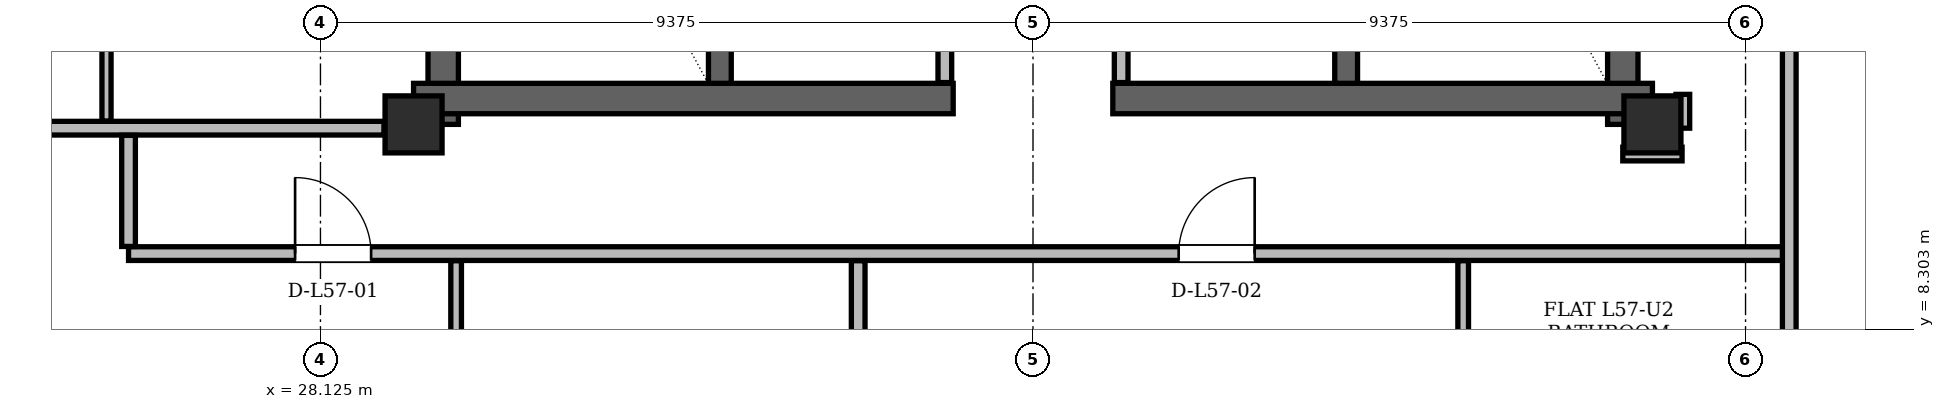
"""IFC4 building model, lengths in metres.
Left out: names, types, materials, properties, quantities, classifications, styles, units other than length and angle.
Written with IfcOpenShell. Run it as: python <this file> out.ifc"""

import sys

from ifc_helpers import new_model, si_unit, direction, frame, frame_2d, origin, origin_2d, place, context, subcontext, project, spatial, rectangle, hollow_rectangle, extrude, element, fill, save


model = new_model("IFC4")
c1 = context("Model", 3, precision=1e-05, world=origin(), true_north=direction((0.0, 1.0)))
c2 = subcontext(c1, "Body", "Model", "MODEL_VIEW")
j1 = project(units=[si_unit("LENGTHUNIT", "METRE"), si_unit("PLANEANGLEUNIT", "RADIAN")], contexts=[c1])
p1 = place(None, origin())
s1 = spatial("IfcSite", under=j1, at=p1, CompositionType="ELEMENT")
p2 = place(p1, origin())
s2 = spatial("IfcBuilding", under=s1, at=p2, CompositionType="ELEMENT")
p3 = place(p2, frame((0.0, 0.0, 216.3)))
s3 = spatial("IfcBuildingStorey", under=s2, at=p3, CompositionType="ELEMENT", Elevation=216.3)
for number, where, z_axis, x_axis in (
    (1, (29.35, 11.0, 0.0), (0.0, 0.0, 1.0), (1.0, 0.0, 0.0)),
    (2, (45.65, 11.0, 0.0), (0.0, 0.0, 1.0), (1.0, 0.0, 0.0)),
):
    element("IfcColumn", number, at=place(p3, frame(where, z_axis=z_axis, x_axis=x_axis)), inside=s3, PredefinedType="COLUMN", context=c2, shape_type="SweptSolid", body=[
        extrude(hollow_rectangle(XDim=0.75, YDim=0.75, WallThickness=0.06, at=origin_2d()), origin(), (0.0, 0.0, 1.0), 3.6),
    ])
for number, where, z_axis, x_axis in (
    (3, (29.74, 11.0, 0.0), (0.0, 0.0, 1.0), (0.0, 1.0, 0.0)),
    (4, (45.26, 11.0, 0.0), (0.0, 0.0, 1.0), (0.0, 1.0, 0.0)),
):
    element("IfcWall", number, at=place(p3, frame(where, z_axis=z_axis, x_axis=x_axis)), inside=s3, PredefinedType="SHEAR", context=c2, shape_type="SweptSolid", body=[
        extrude(rectangle(XDim=13.3, YDim=0.4, at=frame_2d((6.65, 0.0))), origin(), (0.0, 0.0, 1.0), 3.38),
    ])
for number, where, z_axis, x_axis in (
    (5, (29.35, 11.34, 0.0), (0.0, 0.0, 1.0), (1.0, 0.0, 0.0)),
    (6, (38.55, 11.34, 0.0), (0.0, 0.0, 1.0), (1.0, 0.0, 0.0)),
):
    element("IfcWall", number, at=place(p3, frame(where, z_axis=z_axis, x_axis=x_axis)), inside=s3, PredefinedType="SHEAR", context=c2, shape_type="SweptSolid", body=[
        extrude(rectangle(XDim=7.1, YDim=0.4, at=frame_2d((3.55, 0.0))), origin(), (0.0, 0.0, 1.0), 3.38),
    ])
for number, where, z_axis, x_axis in (
    (7, (33.38, 11.54, 0.0), (0.0, 0.0, 1.0), (0.0, 1.0, 0.0)),
    (8, (41.62, 11.54, 0.0), (0.0, 0.0, 1.0), (0.0, 1.0, 0.0)),
):
    element("IfcWall", number, at=place(p3, frame(where, z_axis=z_axis, x_axis=x_axis)), inside=s3, PredefinedType="SHEAR", context=c2, shape_type="SweptSolid", body=[
        extrude(rectangle(XDim=7.62, YDim=0.3, at=frame_2d((3.81, 0.0))), origin(), (0.0, 0.0, 1.0), 3.38),
    ])
p4 = place(p3, frame((59.157, 11.485, 0.0), z_axis=(0.0, 0.0, 1.0), x_axis=(-0.500000353019, 0.866025199969, 0.0)))
e9 = element("IfcWall", 9, at=p4, inside=s3, PredefinedType="SOLIDWALL", context=c2, shape_type="SweptSolid", body=[
    extrude(rectangle(XDim=36.579, YDim=0.29, at=frame_2d((18.289, 0.0))), origin(), (0.0, 0.0, 1.0), 2.677),
])
p5 = place(p4, frame((3.429, 0.0, 0.0)))
e10 = element("IfcOpeningElement", 10, at=p5, cuts=e9, PredefinedType="OPENING", context=c2, shape_type="SweptSolid", body=[
    extrude(rectangle(XDim=1.5, YDim=2.2, at=frame_2d((0.75, 1.1))), frame((0.0, 0.145, 0.0), z_axis=(0.0, -1.0, 0.0), x_axis=(1.0, 0.0, 0.0)), (0.0, 0.0, 1.0), 0.29),
])
p6 = place(p4, frame((27.044, 0.0, 0.0)))
e11 = element("IfcOpeningElement", 11, at=p6, cuts=e9, PredefinedType="OPENING", context=c2, shape_type="SweptSolid", body=[
    extrude(rectangle(XDim=1.5, YDim=2.2, at=frame_2d((0.75, 1.1))), frame((0.0, 0.145, 0.0), z_axis=(0.0, -1.0, 0.0), x_axis=(1.0, 0.0, 0.0)), (0.0, 0.0, 1.0), 0.29),
])
p7 = place(p4, frame((7.913, 0.0, 0.85)))
e12 = element("IfcOpeningElement", 12, at=p7, cuts=e9, PredefinedType="OPENING", context=c2, shape_type="SweptSolid", body=[
    extrude(rectangle(XDim=1.2, YDim=1.48, at=frame_2d((0.6, 0.74))), frame((0.0, 0.145, 0.0), z_axis=(0.0, -1.0, 0.0), x_axis=(1.0, 0.0, 0.0)), (0.0, 0.0, 1.0), 0.29),
])
p8 = place(p4, frame((1.258, 0.0, 0.85)))
e13 = element("IfcOpeningElement", 13, at=p8, cuts=e9, PredefinedType="OPENING", context=c2, shape_type="SweptSolid", body=[
    extrude(rectangle(XDim=1.2, YDim=1.48, at=frame_2d((0.6, 0.74))), frame((0.0, 0.145, 0.0), z_axis=(0.0, -1.0, 0.0), x_axis=(1.0, 0.0, 0.0)), (0.0, 0.0, 1.0), 0.29),
])
p9 = place(p4, frame((12.2, 0.0, 0.85)))
e14 = element("IfcOpeningElement", 14, at=p9, cuts=e9, PredefinedType="OPENING", context=c2, shape_type="SweptSolid", body=[
    extrude(rectangle(XDim=2.0, YDim=1.717, at=frame_2d((1.0, 0.858))), frame((0.0, 0.145, 0.0), z_axis=(0.0, -1.0, 0.0), x_axis=(1.0, 0.0, 0.0)), (0.0, 0.0, 1.0), 0.29),
])
p10 = place(p4, frame((17.302, 0.0, 0.85)))
e15 = element("IfcOpeningElement", 15, at=p10, cuts=e9, PredefinedType="OPENING", context=c2, shape_type="SweptSolid", body=[
    extrude(rectangle(XDim=1.4, YDim=1.6, at=frame_2d((0.7, 0.8))), frame((0.0, 0.145, 0.0), z_axis=(0.0, -1.0, 0.0), x_axis=(1.0, 0.0, 0.0)), (0.0, 0.0, 1.0), 0.29),
])
p11 = place(p4, frame((20.753, 0.0, 0.85)))
e16 = element("IfcOpeningElement", 16, at=p11, cuts=e9, PredefinedType="OPENING", context=c2, shape_type="SweptSolid", body=[
    extrude(rectangle(XDim=1.2, YDim=1.48, at=frame_2d((0.6, 0.74))), frame((0.0, 0.145, 0.0), z_axis=(0.0, -1.0, 0.0), x_axis=(1.0, 0.0, 0.0)), (0.0, 0.0, 1.0), 0.29),
])
p12 = place(p4, frame((34.201, 0.0, 0.85)))
e17 = element("IfcOpeningElement", 17, at=p12, cuts=e9, PredefinedType="OPENING", context=c2, shape_type="SweptSolid", body=[
    extrude(rectangle(XDim=1.2, YDim=1.48, at=frame_2d((0.6, 0.74))), frame((0.0, 0.145, 0.0), z_axis=(0.0, -1.0, 0.0), x_axis=(1.0, 0.0, 0.0)), (0.0, 0.0, 1.0), 0.29),
])
p13 = place(p3, frame((34.132, 43.163, 0.0), z_axis=(0.0, 0.0, 1.0), x_axis=(-0.500000353019, -0.866025199969, 0.0)))
e18 = element("IfcWall", 18, at=p13, inside=s3, PredefinedType="SOLIDWALL", context=c2, shape_type="SweptSolid", body=[
    extrude(rectangle(XDim=36.579, YDim=0.29, at=frame_2d((18.289, 0.0))), origin(), (0.0, 0.0, 1.0), 2.677),
])
p14 = place(p13, frame((3.429, 0.0, 0.0)))
e19 = element("IfcOpeningElement", 19, at=p14, cuts=e18, PredefinedType="OPENING", context=c2, shape_type="SweptSolid", body=[
    extrude(rectangle(XDim=1.5, YDim=2.2, at=frame_2d((0.75, 1.1))), frame((0.0, 0.145, 0.0), z_axis=(0.0, -1.0, 0.0), x_axis=(1.0, 0.0, 0.0)), (0.0, 0.0, 1.0), 0.29),
])
p15 = place(p13, frame((27.044, 0.0, 0.0)))
e20 = element("IfcOpeningElement", 20, at=p15, cuts=e18, PredefinedType="OPENING", context=c2, shape_type="SweptSolid", body=[
    extrude(rectangle(XDim=1.5, YDim=2.2, at=frame_2d((0.75, 1.1))), frame((0.0, 0.145, 0.0), z_axis=(0.0, -1.0, 0.0), x_axis=(1.0, 0.0, 0.0)), (0.0, 0.0, 1.0), 0.29),
])
p16 = place(p13, frame((22.914, 0.0, 0.85)))
e21 = element("IfcOpeningElement", 21, at=p16, cuts=e18, PredefinedType="OPENING", context=c2, shape_type="SweptSolid", body=[
    extrude(rectangle(XDim=1.2, YDim=1.48, at=frame_2d((0.6, 0.74))), frame((0.0, 0.145, 0.0), z_axis=(0.0, -1.0, 0.0), x_axis=(1.0, 0.0, 0.0)), (0.0, 0.0, 1.0), 0.29),
])
p17 = place(p13, frame((33.08, 0.0, 0.85)))
e22 = element("IfcOpeningElement", 22, at=p17, cuts=e18, PredefinedType="OPENING", context=c2, shape_type="SweptSolid", body=[
    extrude(rectangle(XDim=1.2, YDim=1.48, at=frame_2d((0.6, 0.74))), frame((0.0, 0.145, 0.0), z_axis=(0.0, -1.0, 0.0), x_axis=(1.0, 0.0, 0.0)), (0.0, 0.0, 1.0), 0.29),
])
p18 = place(p13, frame((8.479, 0.0, 0.85)))
e23 = element("IfcOpeningElement", 23, at=p18, cuts=e18, PredefinedType="OPENING", context=c2, shape_type="SweptSolid", body=[
    extrude(rectangle(XDim=1.2, YDim=1.48, at=frame_2d((0.6, 0.74))), frame((0.0, 0.145, 0.0), z_axis=(0.0, -1.0, 0.0), x_axis=(1.0, 0.0, 0.0)), (0.0, 0.0, 1.0), 0.29),
])
p19 = place(p13, frame((15.537, 0.0, 0.85)))
e24 = element("IfcOpeningElement", 24, at=p19, cuts=e18, PredefinedType="OPENING", context=c2, shape_type="SweptSolid", body=[
    extrude(rectangle(XDim=2.8, YDim=1.717, at=frame_2d((1.4, 0.858))), frame((0.0, 0.145, 0.0), z_axis=(0.0, -1.0, 0.0), x_axis=(1.0, 0.0, 0.0)), (0.0, 0.0, 1.0), 0.29),
])
p20 = place(p13, frame((1.501, 0.0, 0.85)))
e25 = element("IfcOpeningElement", 25, at=p20, cuts=e18, PredefinedType="OPENING", context=c2, shape_type="SweptSolid", body=[
    extrude(rectangle(XDim=1.2, YDim=1.48, at=frame_2d((0.6, 0.74))), frame((0.0, 0.145, 0.0), z_axis=(0.0, -1.0, 0.0), x_axis=(1.0, 0.0, 0.0)), (0.0, 0.0, 1.0), 0.29),
])
p21 = place(p3, frame((36.34, 11.55, 0.0), z_axis=(0.0, 0.0, 1.0), x_axis=(0.0, 1.0, 0.0)))
e26 = element("IfcWall", 26, at=p21, inside=s3, PredefinedType="PARTITIONING", context=c2, shape_type="SweptSolid", body=[
    extrude(rectangle(XDim=5.55, YDim=0.18, at=frame_2d((2.775, 0.0))), origin(), (0.0, 0.0, 1.0), 3.38),
])
p22 = place(p21, frame((2.85, 0.0, 0.0)))
e27 = element("IfcOpeningElement", 27, at=p22, cuts=e26, PredefinedType="OPENING", context=c2, shape_type="SweptSolid", body=[
    extrude(rectangle(XDim=0.95, YDim=2.1, at=frame_2d((0.475, 1.05))), frame((0.0, 0.09, 0.0), z_axis=(0.0, -1.0, 0.0), x_axis=(1.0, 0.0, 0.0)), (0.0, 0.0, 1.0), 0.18),
])
p23 = place(p3, frame((38.66, 11.55, 0.0), z_axis=(0.0, 0.0, 1.0), x_axis=(0.0, 1.0, 0.0)))
e28 = element("IfcWall", 28, at=p23, inside=s3, PredefinedType="PARTITIONING", context=c2, shape_type="SweptSolid", body=[
    extrude(rectangle(XDim=5.55, YDim=0.18, at=frame_2d((2.775, 0.0))), origin(), (0.0, 0.0, 1.0), 3.38),
])
p24 = place(p23, frame((3.15, 0.0, 0.0)))
e29 = element("IfcOpeningElement", 29, at=p24, cuts=e28, PredefinedType="OPENING", context=c2, shape_type="SweptSolid", body=[
    extrude(rectangle(XDim=0.95, YDim=2.1, at=frame_2d((0.475, 1.05))), frame((0.0, 0.09, 0.0), z_axis=(0.0, -1.0, 0.0), x_axis=(1.0, 0.0, 0.0)), (0.0, 0.0, 1.0), 0.18),
])
p25 = place(p3, frame((25.6, 9.3, 0.0), z_axis=(0.0, 0.0, 1.0), x_axis=(1.0, 0.0, 0.0)))
e30 = element("IfcWall", 30, at=p25, inside=s3, PredefinedType="PARTITIONING", context=c2, shape_type="SweptSolid", body=[
    extrude(rectangle(XDim=21.85, YDim=0.18, at=frame_2d((10.925, 0.0))), origin(), (0.0, 0.0, 1.0), 2.913),
])
p26 = place(p25, frame((2.191, 0.0, 0.0)))
e31 = element("IfcOpeningElement", 31, at=p26, cuts=e30, PredefinedType="OPENING", context=c2, shape_type="SweptSolid", body=[
    extrude(rectangle(XDim=1.0, YDim=2.18, at=frame_2d((0.5, 1.09))), frame((0.0, 0.09, 0.0), z_axis=(0.0, -1.0, 0.0), x_axis=(1.0, 0.0, 0.0)), (0.0, 0.0, 1.0), 0.18),
])
p27 = place(p25, frame((13.817, 0.0, 0.0)))
e32 = element("IfcOpeningElement", 32, at=p27, cuts=e30, PredefinedType="OPENING", context=c2, shape_type="SweptSolid", body=[
    extrude(rectangle(XDim=1.0, YDim=2.18, at=frame_2d((0.5, 1.09))), frame((0.0, 0.09, 0.0), z_axis=(0.0, -1.0, 0.0), x_axis=(1.0, 0.0, 0.0)), (0.0, 0.0, 1.0), 0.18),
])
p28 = place(p3, frame((45.26, 10.61, 0.0), z_axis=(0.0, 0.0, 1.0), x_axis=(1.0, 0.0, 0.0)))
e33 = element("IfcWall", 33, at=p28, inside=s3, PredefinedType="PARTITIONING", context=c2, shape_type="SweptSolid", body=[
    extrude(rectangle(XDim=0.78, YDim=0.18, at=frame_2d((0.39, 0.0))), origin(), (0.0, 0.0, 1.0), 3.38),
])
p29 = place(p3, frame((16.324, 10.95, 0.0), z_axis=(0.0, 0.0, 1.0), x_axis=(1.0, 0.0, 0.0)))
e34 = element("IfcWall", 34, at=p29, inside=s3, PredefinedType="PARTITIONING", context=c2, shape_type="SweptSolid", body=[
    extrude(rectangle(XDim=12.636, YDim=0.18, at=frame_2d((6.318, 0.0))), origin(), (0.0, 0.0, 1.0), 2.913),
])
p30 = place(p3, frame((25.31, 11.044, 0.0), z_axis=(0.0, 0.0, 1.0), x_axis=(0.0, 1.0, 0.0)))
e35 = element("IfcWall", 35, at=p30, inside=s3, PredefinedType="PARTITIONING", context=c2, shape_type="SweptSolid", body=[
    extrude(rectangle(XDim=3.592, YDim=0.12, at=frame_2d((1.796, 0.0))), origin(), (0.0, 0.0, 1.0), 3.38),
])
p31 = place(p3, frame((25.6, 9.394, 0.0), z_axis=(0.0, 0.0, 1.0), x_axis=(0.0, 1.0, 0.0)))
e36 = element("IfcWall", 36, at=p31, inside=s3, PredefinedType="PARTITIONING", context=c2, shape_type="SweptSolid", body=[
    extrude(rectangle(XDim=1.462, YDim=0.18, at=frame_2d((0.731, 0.0))), origin(), (0.0, 0.0, 1.0), 3.38),
])
p32 = place(p3, frame((29.91, 5.801, 0.0), z_axis=(0.0, 0.0, 1.0), x_axis=(0.0, 1.0, 0.0)))
e37 = element("IfcWall", 37, at=p32, inside=s3, PredefinedType="PARTITIONING", context=c2, shape_type="SweptSolid", body=[
    extrude(rectangle(XDim=3.405, YDim=0.14, at=frame_2d((1.703, 0.0))), origin(), (0.0, 0.0, 1.0), 3.38),
])
p33 = place(p32, frame((1.31, 0.0, 0.0)))
e38 = element("IfcOpeningElement", 38, at=p33, cuts=e37, PredefinedType="OPENING", context=c2, shape_type="SweptSolid", body=[
    extrude(rectangle(XDim=0.88, YDim=2.08, at=frame_2d((0.44, 1.04))), frame((0.0, 0.07, 0.0), z_axis=(0.0, -1.0, 0.0), x_axis=(1.0, 0.0, 0.0)), (0.0, 0.0, 1.0), 0.14),
])
p34 = place(p3, frame((35.2, 5.801, 0.0), z_axis=(0.0, 0.0, 1.0), x_axis=(0.0, 1.0, 0.0)))
e39 = element("IfcWall", 39, at=p34, inside=s3, PredefinedType="PARTITIONING", context=c2, shape_type="SweptSolid", body=[
    extrude(rectangle(XDim=3.405, YDim=0.18, at=frame_2d((1.703, 0.0))), origin(), (0.0, 0.0, 1.0), 3.38),
])
p35 = place(p3, frame((43.16, 5.801, 0.0), z_axis=(0.0, 0.0, 1.0), x_axis=(0.0, 1.0, 0.0)))
e40 = element("IfcWall", 40, at=p35, inside=s3, PredefinedType="PARTITIONING", context=c2, shape_type="SweptSolid", body=[
    extrude(rectangle(XDim=3.405, YDim=0.14, at=frame_2d((1.703, 0.0))), origin(), (0.0, 0.0, 1.0), 3.38),
])
p36 = place(p35, frame((1.31, 0.0, 0.0)))
e41 = element("IfcOpeningElement", 41, at=p36, cuts=e40, PredefinedType="OPENING", context=c2, shape_type="SweptSolid", body=[
    extrude(rectangle(XDim=0.88, YDim=2.08, at=frame_2d((0.44, 1.04))), frame((0.0, 0.07, 0.0), z_axis=(0.0, -1.0, 0.0), x_axis=(1.0, 0.0, 0.0)), (0.0, 0.0, 1.0), 0.14),
])
p37 = place(p3, frame((46.05, 10.95, 0.0), z_axis=(0.0, 0.0, 1.0), x_axis=(0.0, 1.0, 0.0)))
e42 = element("IfcWall", 42, at=p37, inside=s3, PredefinedType="PARTITIONING", context=c2, shape_type="SweptSolid", body=[
    extrude(rectangle(XDim=0.445, YDim=0.18, at=frame_2d((0.223, 0.0))), origin(), (0.0, 0.0, 1.0), 2.913),
])
p38 = place(p3, frame((47.45, 5.801, 0.0), z_axis=(0.0, 0.0, 1.0), x_axis=(0.0, 1.0, 0.0)))
e43 = element("IfcWall", 43, at=p38, inside=s3, PredefinedType="PARTITIONING", context=c2, shape_type="SweptSolid", body=[
    extrude(rectangle(XDim=25.664, YDim=0.18, at=frame_2d((12.832, 0.0))), origin(), (0.0, 0.0, 1.0), 2.913),
])
p39 = place(p38, frame((9.122, 0.0, 0.0)))
e44 = element("IfcOpeningElement", 44, at=p39, cuts=e43, PredefinedType="OPENING", context=c2, shape_type="SweptSolid", body=[
    extrude(rectangle(XDim=1.0, YDim=2.18, at=frame_2d((0.5, 1.09))), frame((0.0, 0.09, 0.0), z_axis=(0.0, -1.0, 0.0), x_axis=(1.0, 0.0, 0.0)), (0.0, 0.0, 1.0), 0.18),
])
p40 = place(p38, frame((15.912, 0.0, 0.0)))
e45 = element("IfcOpeningElement", 45, at=p40, cuts=e43, PredefinedType="OPENING", context=c2, shape_type="SweptSolid", body=[
    extrude(rectangle(XDim=1.0, YDim=2.18, at=frame_2d((0.5, 1.09))), frame((0.0, 0.09, 0.0), z_axis=(0.0, -1.0, 0.0), x_axis=(1.0, 0.0, 0.0)), (0.0, 0.0, 1.0), 0.18),
])
p41 = place(p26, origin())
e46 = element("IfcDoor", 46, at=p41, inside=s3, OperationType="SINGLE_SWING_LEFT", PredefinedType="DOOR", context=c2, shape_type="SweptSolid", body=[
    extrude(rectangle(XDim=1.0, YDim=2.18, at=frame_2d((0.5, 1.09))), frame((0.0, 0.025, 0.0), z_axis=(0.0, -1.0, 0.0), x_axis=(1.0, 0.0, 0.0)), (0.0, 0.0, 1.0), 0.05),
])
fill(e31, e46)
p42 = place(p27, origin())
e47 = element("IfcDoor", 47, at=p42, inside=s3, OperationType="SINGLE_SWING_RIGHT", PredefinedType="DOOR", context=c2, shape_type="SweptSolid", body=[
    extrude(rectangle(XDim=1.0, YDim=2.18, at=frame_2d((0.5, 1.09))), frame((0.0, 0.025, 0.0), z_axis=(0.0, -1.0, 0.0), x_axis=(1.0, 0.0, 0.0)), (0.0, 0.0, 1.0), 0.05),
])
fill(e32, e47)
save(model, sys.argv[1])
